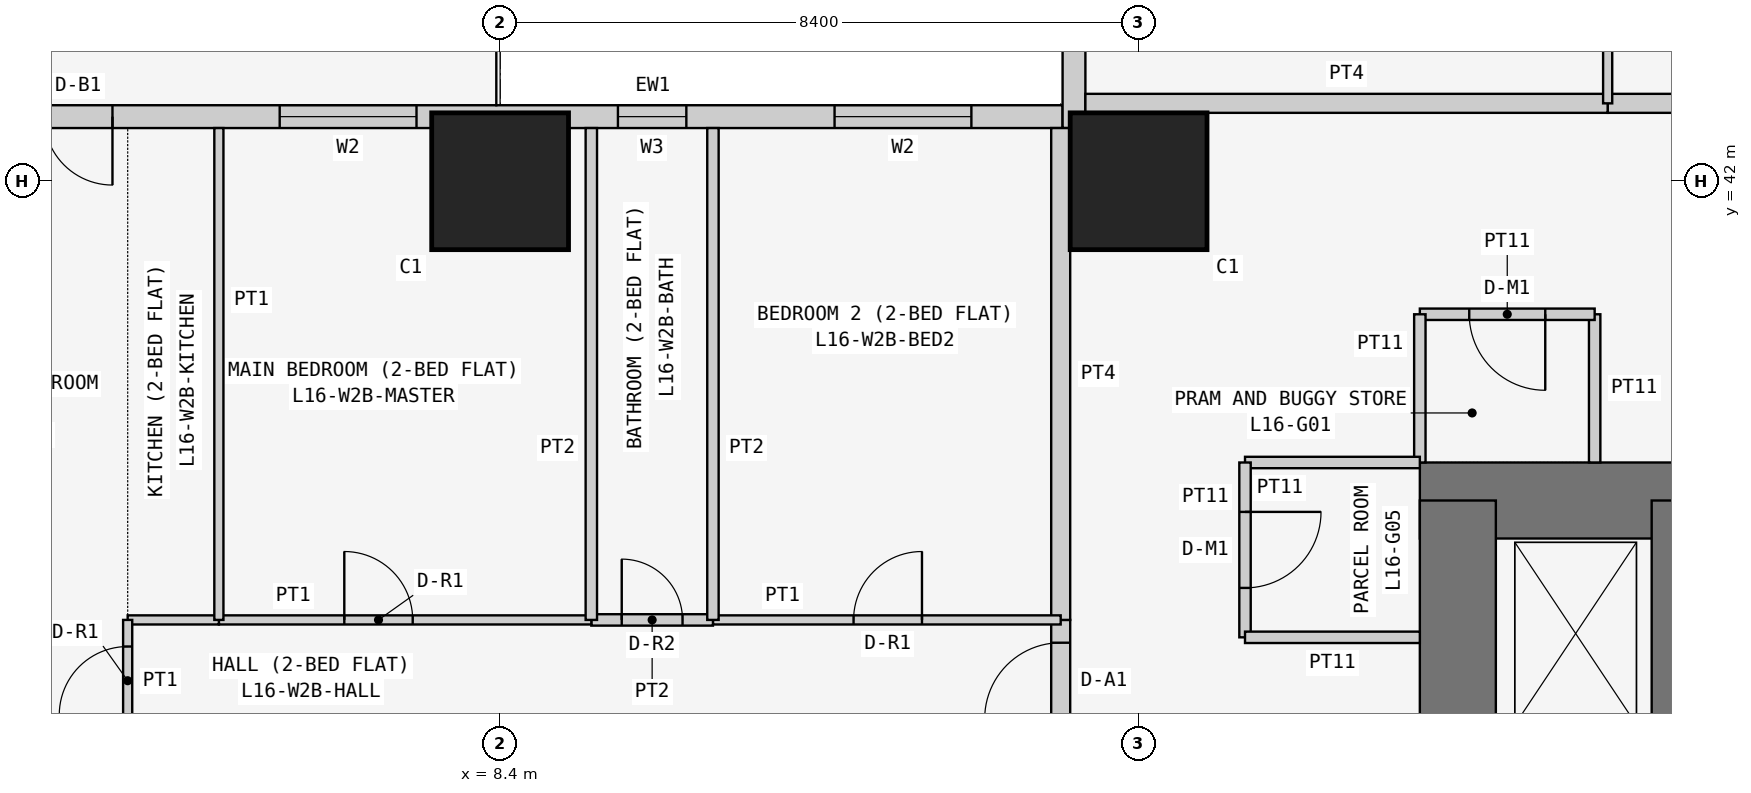
"""IFC4 building model, lengths in metres.
Left out: names, types, materials, properties, quantities, classifications, styles, units other than length and angle.
Written with IfcOpenShell. Run it as: python <this file> out.ifc"""

import sys

from ifc_helpers import new_model, si_unit, direction, frame, frame_2d, origin, origin_2d, place, context, subcontext, project, spatial, rectangle, extrude, element, fill, save


model = new_model("IFC4")
c1 = context("Model", 3, precision=1e-05, world=origin(), true_north=direction((0.0, 1.0)))
c2 = subcontext(c1, "Body", "Model", "MODEL_VIEW")
j1 = project(units=[si_unit("LENGTHUNIT", "METRE"), si_unit("PLANEANGLEUNIT", "RADIAN")], contexts=[c1])
p1 = place(None, origin())
s1 = spatial("IfcSite", under=j1, at=p1, CompositionType="ELEMENT")
p2 = place(p1, origin())
s2 = spatial("IfcBuilding", under=s1, at=p2, CompositionType="ELEMENT")
p3 = place(p2, frame((0.0, 0.0, 66.9)))
s3 = spatial("IfcBuildingStorey", under=s2, at=p3, CompositionType="ELEMENT", Elevation=66.9)
for number, where, z_axis, x_axis in (
    (1, (8.4, 42.0, 0.0), (0.0, 0.0, 1.0), (1.0, 0.0, 0.0)),
    (2, (16.8, 42.0, 0.0), (0.0, 0.0, 1.0), (1.0, 0.0, 0.0)),
):
    element("IfcColumn", number, at=place(p3, frame(where, z_axis=z_axis, x_axis=x_axis)), inside=s3, PredefinedType="COLUMN", context=c2, shape_type="SweptSolid", body=[
        extrude(rectangle(XDim=1.8, YDim=1.8, at=origin_2d()), origin(), (0.0, 0.0, 1.0), 3.6),
    ])
p4 = place(p3, frame((37.8, 37.8, 0.0), z_axis=(0.0, 0.0, 1.0), x_axis=(-1.0, 0.0, 0.0)))
e3 = element("IfcWall", 3, at=p4, inside=s3, PredefinedType="SHEAR", context=c2, shape_type="SweptSolid", body=[
    extrude(rectangle(XDim=17.3, YDim=1.0, at=frame_2d((8.65, 0.0))), origin(), (0.0, 0.0, 1.0), 3.6),
])
p5 = place(p3, frame((21.0, 37.8, 0.0), z_axis=(0.0, 0.0, 1.0), x_axis=(0.0, -1.0, 0.0)))
e4 = element("IfcWall", 4, at=p5, inside=s3, PredefinedType="SHEAR", context=c2, shape_type="SweptSolid", body=[
    extrude(rectangle(XDim=17.3, YDim=1.0, at=frame_2d((8.65, 0.0))), origin(), (0.0, 0.0, 1.0), 3.6),
])
p6 = place(p5, frame((5.4, 0.0, 0.0)))
e5 = element("IfcOpeningElement", 5, at=p6, cuts=e4, PredefinedType="OPENING", context=c2, shape_type="SweptSolid", body=[
    extrude(rectangle(XDim=1.2, YDim=2.1, at=frame_2d((0.6, 1.05))), frame((0.0, 0.51, 0.0), z_axis=(0.0, -1.0, 0.0), x_axis=(1.0, 0.0, 0.0)), (0.0, 0.0, 1.0), 1.02),
])
p7 = place(p3, frame((23.8, 34.6, 0.0), z_axis=(0.0, 0.0, 1.0), x_axis=(0.0, 1.0, 0.0)))
e6 = element("IfcWall", 6, at=p7, inside=s3, PredefinedType="SHEAR", context=c2, shape_type="SweptSolid", body=[
    extrude(rectangle(XDim=3.2, YDim=0.5, at=frame_2d((1.6, 0.0))), origin(), (0.0, 0.0, 1.0), 3.6),
])
p8 = place(p3, frame((15.8, 42.85, 0.0), z_axis=(0.0, 0.0, 1.0), x_axis=(-1.0, 0.0, 0.0)))
e7 = element("IfcWall", 7, at=p8, inside=s3, PredefinedType="SOLIDWALL", context=c2, shape_type="SweptSolid", body=[
    extrude(rectangle(XDim=15.4, YDim=0.3, at=frame_2d((7.7, 0.0))), origin(), (0.0, 0.0, 1.0), 3.45),
])
p9 = place(p8, frame((1.2, 0.0, 0.9)))
e8 = element("IfcOpeningElement", 8, at=p9, cuts=e7, PredefinedType="OPENING", context=c2, shape_type="SweptSolid", body=[
    extrude(rectangle(XDim=1.8, YDim=1.5, at=frame_2d((0.9, 0.75))), frame((0.0, 0.16, 0.0), z_axis=(0.0, -1.0, 0.0), x_axis=(1.0, 0.0, 0.0)), (0.0, 0.0, 1.0), 0.32),
])
p10 = place(p8, frame((4.95, 0.0, 1.5)))
e9 = element("IfcOpeningElement", 9, at=p10, cuts=e7, PredefinedType="OPENING", context=c2, shape_type="SweptSolid", body=[
    extrude(rectangle(XDim=0.9, YDim=0.7, at=frame_2d((0.45, 0.35))), frame((0.0, 0.16, 0.0), z_axis=(0.0, -1.0, 0.0), x_axis=(1.0, 0.0, 0.0)), (0.0, 0.0, 1.0), 0.32),
])
p11 = place(p8, frame((8.5, 0.0, 0.9)))
e10 = element("IfcOpeningElement", 10, at=p11, cuts=e7, PredefinedType="OPENING", context=c2, shape_type="SweptSolid", body=[
    extrude(rectangle(XDim=1.8, YDim=1.5, at=frame_2d((0.9, 0.75))), frame((0.0, 0.16, 0.0), z_axis=(0.0, -1.0, 0.0), x_axis=(1.0, 0.0, 0.0)), (0.0, 0.0, 1.0), 0.32),
])
p12 = place(p8, frame((12.5, 0.0, 0.0)))
e11 = element("IfcOpeningElement", 11, at=p12, cuts=e7, PredefinedType="OPENING", context=c2, shape_type="SweptSolid", body=[
    extrude(rectangle(XDim=0.9, YDim=2.4, at=frame_2d((0.45, 1.2))), frame((0.0, 0.16, 0.0), z_axis=(0.0, -1.0, 0.0), x_axis=(1.0, 0.0, 0.0)), (0.0, 0.0, 1.0), 0.32),
])
p13 = place(p8, frame((13.5, 0.0, 0.9)))
e12 = element("IfcOpeningElement", 12, at=p13, cuts=e7, PredefinedType="OPENING", context=c2, shape_type="SweptSolid", body=[
    extrude(rectangle(XDim=1.2, YDim=1.5, at=frame_2d((0.6, 0.75))), frame((0.0, 0.16, 0.0), z_axis=(0.0, -1.0, 0.0), x_axis=(1.0, 0.0, 0.0)), (0.0, 0.0, 1.0), 0.32),
])
p14 = place(p3, frame((15.95, 58.4, 0.0), z_axis=(0.0, 0.0, 1.0), x_axis=(0.0, -1.0, 0.0)))
e13 = element("IfcWall", 13, at=p14, inside=s3, PredefinedType="SOLIDWALL", context=c2, shape_type="SweptSolid", body=[
    extrude(rectangle(XDim=15.7, YDim=0.3, at=frame_2d((7.85, 0.0))), origin(), (0.0, 0.0, 1.0), 3.45),
])
p15 = place(p14, frame((12.4, 0.0, 0.9)))
e14 = element("IfcOpeningElement", 14, at=p15, cuts=e13, PredefinedType="OPENING", context=c2, shape_type="SweptSolid", body=[
    extrude(rectangle(XDim=1.8, YDim=1.5, at=frame_2d((0.9, 0.75))), frame((0.0, 0.16, 0.0), z_axis=(0.0, -1.0, 0.0), x_axis=(1.0, 0.0, 0.0)), (0.0, 0.0, 1.0), 0.32),
])
p16 = place(p14, frame((9.55, 0.0, 1.5)))
e15 = element("IfcOpeningElement", 15, at=p16, cuts=e13, PredefinedType="OPENING", context=c2, shape_type="SweptSolid", body=[
    extrude(rectangle(XDim=0.9, YDim=0.7, at=frame_2d((0.45, 0.35))), frame((0.0, 0.16, 0.0), z_axis=(0.0, -1.0, 0.0), x_axis=(1.0, 0.0, 0.0)), (0.0, 0.0, 1.0), 0.32),
])
p17 = place(p14, frame((5.1, 0.0, 0.9)))
e16 = element("IfcOpeningElement", 16, at=p17, cuts=e13, PredefinedType="OPENING", context=c2, shape_type="SweptSolid", body=[
    extrude(rectangle(XDim=1.8, YDim=1.5, at=frame_2d((0.9, 0.75))), frame((0.0, 0.16, 0.0), z_axis=(0.0, -1.0, 0.0), x_axis=(1.0, 0.0, 0.0)), (0.0, 0.0, 1.0), 0.32),
])
p18 = place(p14, frame((2.0, 0.0, 0.0)))
e17 = element("IfcOpeningElement", 17, at=p18, cuts=e13, PredefinedType="OPENING", context=c2, shape_type="SweptSolid", body=[
    extrude(rectangle(XDim=0.9, YDim=2.4, at=frame_2d((0.45, 1.2))), frame((0.0, 0.16, 0.0), z_axis=(0.0, -1.0, 0.0), x_axis=(1.0, 0.0, 0.0)), (0.0, 0.0, 1.0), 0.32),
])
p19 = place(p14, frame((0.7, 0.0, 0.9)))
e18 = element("IfcOpeningElement", 18, at=p19, cuts=e13, PredefinedType="OPENING", context=c2, shape_type="SweptSolid", body=[
    extrude(rectangle(XDim=1.2, YDim=1.5, at=frame_2d((0.6, 0.75))), frame((0.0, 0.16, 0.0), z_axis=(0.0, -1.0, 0.0), x_axis=(1.0, 0.0, 0.0)), (0.0, 0.0, 1.0), 0.32),
])
p20 = place(p3, frame((22.8, 38.3, 0.0), z_axis=(0.0, 0.0, 1.0), x_axis=(0.0, 1.0, 0.0)))
e19 = element("IfcWall", 19, at=p20, inside=s3, PredefinedType="PARTITIONING", context=c2, shape_type="SweptSolid", body=[
    extrude(rectangle(XDim=1.95, YDim=0.15, at=frame_2d((0.975, 0.0))), origin(), (0.0, 0.0, 1.0), 3.45),
])
p21 = place(p3, frame((22.8, 40.25, 0.0), z_axis=(0.0, 0.0, 1.0), x_axis=(-1.0, 0.0, 0.0)))
e20 = element("IfcWall", 20, at=p21, inside=s3, PredefinedType="PARTITIONING", context=c2, shape_type="SweptSolid", body=[
    extrude(rectangle(XDim=2.3, YDim=0.15, at=frame_2d((1.15, 0.0))), origin(), (0.0, 0.0, 1.0), 3.45),
])
p22 = place(p21, frame((0.65, 0.0, 0.0)))
e21 = element("IfcOpeningElement", 21, at=p22, cuts=e20, PredefinedType="OPENING", context=c2, shape_type="SweptSolid", body=[
    extrude(rectangle(XDim=1.0, YDim=2.1, at=frame_2d((0.5, 1.05))), frame((0.0, 0.085, 0.0), z_axis=(0.0, -1.0, 0.0), x_axis=(1.0, 0.0, 0.0)), (0.0, 0.0, 1.0), 0.17),
])
p23 = place(p3, frame((20.5, 40.25, 0.0), z_axis=(0.0, 0.0, 1.0), x_axis=(0.0, -1.0, 0.0)))
e22 = element("IfcWall", 22, at=p23, inside=s3, PredefinedType="PARTITIONING", context=c2, shape_type="SweptSolid", body=[
    extrude(rectangle(XDim=1.95, YDim=0.15, at=frame_2d((0.975, 0.0))), origin(), (0.0, 0.0, 1.0), 3.45),
])
p24 = place(p3, frame((20.5, 38.3, 0.0), z_axis=(0.0, 0.0, 1.0), x_axis=(-1.0, 0.0, 0.0)))
e23 = element("IfcWall", 23, at=p24, inside=s3, PredefinedType="PARTITIONING", context=c2, shape_type="SweptSolid", body=[
    extrude(rectangle(XDim=2.3, YDim=0.15, at=frame_2d((1.15, 0.0))), origin(), (0.0, 0.0, 1.0), 3.45),
])
p25 = place(p3, frame((18.2, 38.3, 0.0), z_axis=(0.0, 0.0, 1.0), x_axis=(0.0, -1.0, 0.0)))
e24 = element("IfcWall", 24, at=p25, inside=s3, PredefinedType="PARTITIONING", context=c2, shape_type="SweptSolid", body=[
    extrude(rectangle(XDim=2.3, YDim=0.15, at=frame_2d((1.15, 0.0))), origin(), (0.0, 0.0, 1.0), 3.45),
])
p26 = place(p25, frame((0.65, 0.0, 0.0)))
e25 = element("IfcOpeningElement", 25, at=p26, cuts=e24, PredefinedType="OPENING", context=c2, shape_type="SweptSolid", body=[
    extrude(rectangle(XDim=1.0, YDim=2.1, at=frame_2d((0.5, 1.05))), frame((0.0, 0.085, 0.0), z_axis=(0.0, -1.0, 0.0), x_axis=(1.0, 0.0, 0.0)), (0.0, 0.0, 1.0), 0.17),
])
p27 = place(p3, frame((18.2, 36.0, 0.0), z_axis=(0.0, 0.0, 1.0), x_axis=(1.0, 0.0, 0.0)))
e26 = element("IfcWall", 26, at=p27, inside=s3, PredefinedType="PARTITIONING", context=c2, shape_type="SweptSolid", body=[
    extrude(rectangle(XDim=2.3, YDim=0.15, at=frame_2d((1.15, 0.0))), origin(), (0.0, 0.0, 1.0), 3.45),
])
p28 = place(p3, frame((22.971, 43.025, 0.0), z_axis=(0.0, 0.0, 1.0), x_axis=(1.0, 0.0, 0.0)))
e27 = element("IfcWall", 27, at=p28, inside=s3, PredefinedType="PARTITIONING", context=c2, shape_type="SweptSolid", body=[
    extrude(rectangle(XDim=1.2, YDim=0.25, at=frame_2d((0.6, 0.0))), origin(), (0.0, 0.0, 1.0), 3.45),
])
p29 = place(p3, frame((16.1, 43.025, 0.0), z_axis=(0.0, 0.0, 1.0), x_axis=(1.0, 0.0, 0.0)))
e28 = element("IfcWall", 28, at=p29, inside=s3, PredefinedType="PARTITIONING", context=c2, shape_type="SweptSolid", body=[
    extrude(rectangle(XDim=6.871, YDim=0.25, at=frame_2d((3.436, 0.0))), origin(), (0.0, 0.0, 1.0), 3.45),
])
p30 = place(p3, frame((15.775, 34.629, 0.0), z_axis=(0.0, 0.0, 1.0), x_axis=(0.0, 1.0, 0.0)))
e29 = element("IfcWall", 29, at=p30, inside=s3, PredefinedType="PARTITIONING", context=c2, shape_type="SweptSolid", body=[
    extrude(rectangle(XDim=1.6, YDim=0.25, at=frame_2d((0.8, 0.0))), origin(), (0.0, 0.0, 1.0), 3.45),
])
p31 = place(p30, frame((0.3, 0.0, 0.0)))
e30 = element("IfcOpeningElement", 30, at=p31, cuts=e29, PredefinedType="OPENING", context=c2, shape_type="SweptSolid", body=[
    extrude(rectangle(XDim=1.0, YDim=2.1, at=frame_2d((0.5, 1.05))), frame((0.0, 0.135, 0.0), z_axis=(0.0, -1.0, 0.0), x_axis=(1.0, 0.0, 0.0)), (0.0, 0.0, 1.0), 0.27),
])
p32 = place(p3, frame((15.775, 36.229, 0.0), z_axis=(0.0, 0.0, 1.0), x_axis=(0.0, 1.0, 0.0)))
e31 = element("IfcWall", 31, at=p32, inside=s3, PredefinedType="PARTITIONING", context=c2, shape_type="SweptSolid", body=[
    extrude(rectangle(XDim=6.471, YDim=0.25, at=frame_2d((3.235, 0.0))), origin(), (0.0, 0.0, 1.0), 3.45),
])
p33 = place(p3, frame((22.971, 47.6, 0.0), z_axis=(0.0, 0.0, 1.0), x_axis=(0.0, -1.0, 0.0)))
e32 = element("IfcWall", 32, at=p33, inside=s3, PredefinedType="PARTITIONING", context=c2, shape_type="SweptSolid", body=[
    extrude(rectangle(XDim=4.575, YDim=0.12, at=frame_2d((2.288, 0.0))), origin(), (0.0, 0.0, 1.0), 3.45),
])
p34 = place(p33, frame((1.85, 0.0, 0.0)))
e33 = element("IfcOpeningElement", 33, at=p34, cuts=e32, PredefinedType="OPENING", context=c2, shape_type="SweptSolid", body=[
    extrude(rectangle(XDim=0.9, YDim=2.1, at=frame_2d((0.45, 1.05))), frame((0.0, 0.07, 0.0), z_axis=(0.0, -1.0, 0.0), x_axis=(1.0, 0.0, 0.0)), (0.0, 0.0, 1.0), 0.14),
])
p35 = place(p3, frame((11.2, 36.229, 0.0), z_axis=(0.0, 0.0, 1.0), x_axis=(1.0, 0.0, 0.0)))
e34 = element("IfcWall", 34, at=p35, inside=s3, PredefinedType="PARTITIONING", context=c2, shape_type="SweptSolid", body=[
    extrude(rectangle(XDim=4.575, YDim=0.12, at=frame_2d((2.288, 0.0))), origin(), (0.0, 0.0, 1.0), 3.45),
])
p36 = place(p35, frame((1.85, 0.0, 0.0)))
e35 = element("IfcOpeningElement", 35, at=p36, cuts=e34, PredefinedType="OPENING", context=c2, shape_type="SweptSolid", body=[
    extrude(rectangle(XDim=0.9, YDim=2.1, at=frame_2d((0.45, 1.05))), frame((0.0, 0.07, 0.0), z_axis=(0.0, -1.0, 0.0), x_axis=(1.0, 0.0, 0.0)), (0.0, 0.0, 1.0), 0.14),
])
p37 = place(p3, frame((9.6, 36.229, 0.0), z_axis=(0.0, 0.0, 1.0), x_axis=(1.0, 0.0, 0.0)))
e36 = element("IfcWall", 36, at=p37, inside=s3, PredefinedType="PARTITIONING", context=c2, shape_type="SweptSolid", body=[
    extrude(rectangle(XDim=1.6, YDim=0.15, at=frame_2d((0.8, 0.0))), origin(), (0.0, 0.0, 1.0), 3.45),
])
p38 = place(p37, frame((0.4, 0.0, 0.0)))
e37 = element("IfcOpeningElement", 37, at=p38, cuts=e36, PredefinedType="OPENING", context=c2, shape_type="SweptSolid", body=[
    extrude(rectangle(XDim=0.8, YDim=2.1, at=frame_2d((0.4, 1.05))), frame((0.0, 0.085, 0.0), z_axis=(0.0, -1.0, 0.0), x_axis=(1.0, 0.0, 0.0)), (0.0, 0.0, 1.0), 0.17),
])
p39 = place(p3, frame((4.7, 36.229, 0.0), z_axis=(0.0, 0.0, 1.0), x_axis=(1.0, 0.0, 0.0)))
e38 = element("IfcWall", 38, at=p39, inside=s3, PredefinedType="PARTITIONING", context=c2, shape_type="SweptSolid", body=[
    extrude(rectangle(XDim=4.9, YDim=0.12, at=frame_2d((2.45, 0.0))), origin(), (0.0, 0.0, 1.0), 3.45),
])
p40 = place(p39, frame((1.65, 0.0, 0.0)))
e39 = element("IfcOpeningElement", 39, at=p40, cuts=e38, PredefinedType="OPENING", context=c2, shape_type="SweptSolid", body=[
    extrude(rectangle(XDim=0.9, YDim=2.1, at=frame_2d((0.45, 1.05))), frame((0.0, 0.07, 0.0), z_axis=(0.0, -1.0, 0.0), x_axis=(1.0, 0.0, 0.0)), (0.0, 0.0, 1.0), 0.14),
])
p41 = place(p3, frame((3.5, 36.229, 0.0), z_axis=(0.0, 0.0, 1.0), x_axis=(1.0, 0.0, 0.0)))
e40 = element("IfcWall", 40, at=p41, inside=s3, PredefinedType="PARTITIONING", context=c2, shape_type="SweptSolid", body=[
    extrude(rectangle(XDim=1.2, YDim=0.12, at=frame_2d((0.6, 0.0))), origin(), (0.0, 0.0, 1.0), 3.45),
])
p42 = place(p3, frame((3.5, 34.629, 0.0), z_axis=(0.0, 0.0, 1.0), x_axis=(0.0, 1.0, 0.0)))
e41 = element("IfcWall", 41, at=p42, inside=s3, PredefinedType="PARTITIONING", context=c2, shape_type="SweptSolid", body=[
    extrude(rectangle(XDim=1.6, YDim=0.12, at=frame_2d((0.8, 0.0))), origin(), (0.0, 0.0, 1.0), 3.45),
])
p43 = place(p42, frame((0.35, 0.0, 0.0)))
e42 = element("IfcOpeningElement", 42, at=p43, cuts=e41, PredefinedType="OPENING", context=c2, shape_type="SweptSolid", body=[
    extrude(rectangle(XDim=0.9, YDim=2.1, at=frame_2d((0.45, 1.05))), frame((0.0, 0.07, 0.0), z_axis=(0.0, -1.0, 0.0), x_axis=(1.0, 0.0, 0.0)), (0.0, 0.0, 1.0), 0.14),
])
for number, where, z_axis, x_axis in (
    (43, (11.2, 36.229, 0.0), (0.0, 0.0, 1.0), (0.0, 1.0, 0.0)),
    (44, (9.6, 36.229, 0.0), (0.0, 0.0, 1.0), (0.0, 1.0, 0.0)),
):
    element("IfcWall", number, at=place(p3, frame(where, z_axis=z_axis, x_axis=x_axis)), inside=s3, PredefinedType="PARTITIONING", context=c2, shape_type="SweptSolid", body=[
        extrude(rectangle(XDim=6.471, YDim=0.15, at=frame_2d((3.235, 0.0))), origin(), (0.0, 0.0, 1.0), 3.45),
    ])
p44 = place(p3, frame((4.7, 36.229, 0.0), z_axis=(0.0, 0.0, 1.0), x_axis=(0.0, 1.0, 0.0)))
e45 = element("IfcWall", 45, at=p44, inside=s3, PredefinedType="PARTITIONING", context=c2, shape_type="SweptSolid", body=[
    extrude(rectangle(XDim=6.471, YDim=0.12, at=frame_2d((3.235, 0.0))), origin(), (0.0, 0.0, 1.0), 3.45),
])
p45 = place(p9, origin())
e46 = element("IfcWindow", 46, at=p45, inside=s3, PartitioningType="SINGLE_PANEL", PredefinedType="WINDOW", context=c2, shape_type="SweptSolid", body=[
    extrude(rectangle(XDim=1.8, YDim=1.5, at=frame_2d((0.9, 0.75))), frame((0.0, 0.03, 0.0), z_axis=(0.0, -1.0, 0.0), x_axis=(1.0, 0.0, 0.0)), (0.0, 0.0, 1.0), 0.06),
])
fill(e8, e46)
p46 = place(p10, origin())
e47 = element("IfcWindow", 47, at=p46, inside=s3, PartitioningType="SINGLE_PANEL", PredefinedType="WINDOW", context=c2, shape_type="SweptSolid", body=[
    extrude(rectangle(XDim=0.9, YDim=0.7, at=frame_2d((0.45, 0.35))), frame((0.0, 0.03, 0.0), z_axis=(0.0, -1.0, 0.0), x_axis=(1.0, 0.0, 0.0)), (0.0, 0.0, 1.0), 0.06),
])
fill(e9, e47)
p47 = place(p11, origin())
e48 = element("IfcWindow", 48, at=p47, inside=s3, PartitioningType="SINGLE_PANEL", PredefinedType="WINDOW", context=c2, shape_type="SweptSolid", body=[
    extrude(rectangle(XDim=1.8, YDim=1.5, at=frame_2d((0.9, 0.75))), frame((0.0, 0.03, 0.0), z_axis=(0.0, -1.0, 0.0), x_axis=(1.0, 0.0, 0.0)), (0.0, 0.0, 1.0), 0.06),
])
fill(e10, e48)
p48 = place(p12, origin())
e49 = element("IfcDoor", 49, at=p48, inside=s3, OperationType="SINGLE_SWING_LEFT", PredefinedType="DOOR", context=c2, shape_type="SweptSolid", body=[
    extrude(rectangle(XDim=0.9, YDim=2.4, at=frame_2d((0.45, 1.2))), frame((0.0, 0.025, 0.0), z_axis=(0.0, -1.0, 0.0), x_axis=(1.0, 0.0, 0.0)), (0.0, 0.0, 1.0), 0.05),
])
fill(e11, e49)
p49 = place(p22, origin())
e50 = element("IfcDoor", 50, at=p49, inside=s3, OperationType="SINGLE_SWING_LEFT", PredefinedType="DOOR", context=c2, shape_type="SweptSolid", body=[
    extrude(rectangle(XDim=1.0, YDim=2.1, at=frame_2d((0.5, 1.05))), frame((0.0, 0.025, 0.0), z_axis=(0.0, -1.0, 0.0), x_axis=(1.0, 0.0, 0.0)), (0.0, 0.0, 1.0), 0.05),
])
fill(e21, e50)
p50 = place(p26, origin())
e51 = element("IfcDoor", 51, at=p50, inside=s3, OperationType="SINGLE_SWING_LEFT", PredefinedType="DOOR", context=c2, shape_type="SweptSolid", body=[
    extrude(rectangle(XDim=1.0, YDim=2.1, at=frame_2d((0.5, 1.05))), frame((0.0, 0.025, 0.0), z_axis=(0.0, -1.0, 0.0), x_axis=(1.0, 0.0, 0.0)), (0.0, 0.0, 1.0), 0.05),
])
fill(e25, e51)
p51 = place(p31, origin())
e52 = element("IfcDoor", 52, at=p51, inside=s3, OperationType="SINGLE_SWING_LEFT", PredefinedType="DOOR", context=c2, shape_type="SweptSolid", body=[
    extrude(rectangle(XDim=1.0, YDim=2.1, at=frame_2d((0.5, 1.05))), frame((0.0, 0.025, 0.0), z_axis=(0.0, -1.0, 0.0), x_axis=(1.0, 0.0, 0.0)), (0.0, 0.0, 1.0), 0.05),
])
fill(e30, e52)
p52 = place(p36, origin())
e53 = element("IfcDoor", 53, at=p52, inside=s3, OperationType="SINGLE_SWING_RIGHT", PredefinedType="DOOR", context=c2, shape_type="SweptSolid", body=[
    extrude(rectangle(XDim=0.9, YDim=2.1, at=frame_2d((0.45, 1.05))), frame((0.0, 0.025, 0.0), z_axis=(0.0, -1.0, 0.0), x_axis=(1.0, 0.0, 0.0)), (0.0, 0.0, 1.0), 0.05),
])
fill(e35, e53)
p53 = place(p38, origin())
e54 = element("IfcDoor", 54, at=p53, inside=s3, OperationType="SINGLE_SWING_LEFT", PredefinedType="DOOR", context=c2, shape_type="SweptSolid", body=[
    extrude(rectangle(XDim=0.8, YDim=2.1, at=frame_2d((0.4, 1.05))), frame((0.0, 0.025, 0.0), z_axis=(0.0, -1.0, 0.0), x_axis=(1.0, 0.0, 0.0)), (0.0, 0.0, 1.0), 0.05),
])
fill(e37, e54)
p54 = place(p40, origin())
e55 = element("IfcDoor", 55, at=p54, inside=s3, OperationType="SINGLE_SWING_LEFT", PredefinedType="DOOR", context=c2, shape_type="SweptSolid", body=[
    extrude(rectangle(XDim=0.9, YDim=2.1, at=frame_2d((0.45, 1.05))), frame((0.0, 0.025, 0.0), z_axis=(0.0, -1.0, 0.0), x_axis=(1.0, 0.0, 0.0)), (0.0, 0.0, 1.0), 0.05),
])
fill(e39, e55)
p55 = place(p43, origin())
e56 = element("IfcDoor", 56, at=p55, inside=s3, OperationType="SINGLE_SWING_LEFT", PredefinedType="DOOR", context=c2, shape_type="SweptSolid", body=[
    extrude(rectangle(XDim=0.9, YDim=2.1, at=frame_2d((0.45, 1.05))), frame((0.0, 0.025, 0.0), z_axis=(0.0, -1.0, 0.0), x_axis=(1.0, 0.0, 0.0)), (0.0, 0.0, 1.0), 0.05),
])
fill(e42, e56)
save(model, sys.argv[1])
